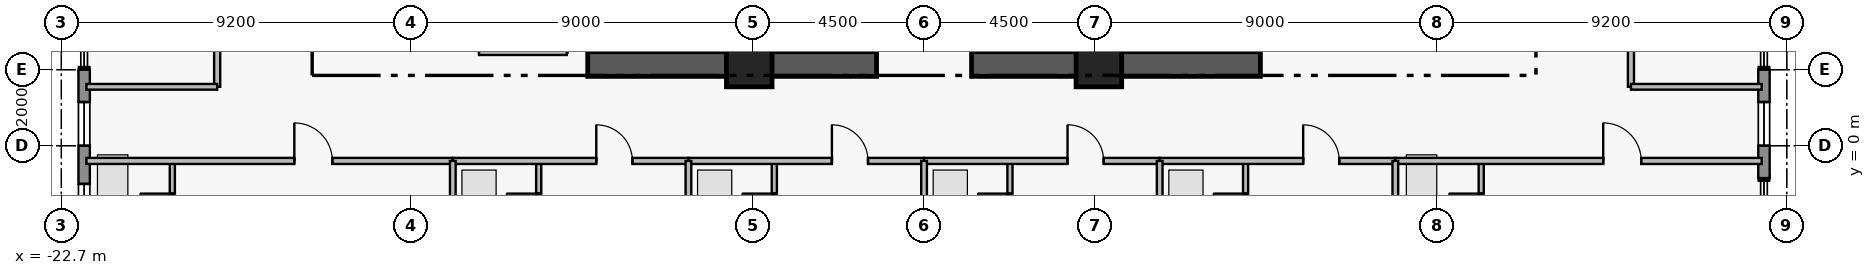
"""IFC4 building model, lengths in metres.
Left out: names, types, materials, properties, quantities, classifications, styles, units other than length and angle.
Written with IfcOpenShell. Run it as: python <this file> out.ifc"""

import sys

from ifc_helpers import new_model, si_unit, direction, frame, frame_2d, origin, origin_2d, place, context, subcontext, project, spatial, rectangle, extrude, element, fill, save


model = new_model("IFC4")
c1 = context("Model", 3, precision=1e-05, world=origin(), true_north=direction((0.0, 1.0)))
c2 = subcontext(c1, "Body", "Model", "MODEL_VIEW")
j1 = project(units=[si_unit("LENGTHUNIT", "METRE"), si_unit("PLANEANGLEUNIT", "RADIAN")], contexts=[c1])
p1 = place(None, origin())
s1 = spatial("IfcSite", under=j1, at=p1, CompositionType="ELEMENT")
p2 = place(p1, origin())
s2 = spatial("IfcBuilding", under=s1, at=p2, CompositionType="ELEMENT")
p3 = place(p2, frame((0.0, 0.0, 192.4)))
s3 = spatial("IfcBuildingStorey", under=s2, at=p3, CompositionType="ELEMENT", Elevation=192.4)
for number, where, z_axis, x_axis in (
    (1, (-8.85, 2.15, 0.0), (0.0, 0.0, 1.0), (1.0, 0.0, 0.0)),
    (2, (1.25, 2.15, 0.0), (0.0, 0.0, 1.0), (1.0, 0.0, 0.0)),
):
    element("IfcWall", number, at=place(p3, frame(where, z_axis=z_axis, x_axis=x_axis)), inside=s3, PredefinedType="SHEAR", context=c2, shape_type="SweptSolid", body=[
        extrude(rectangle(XDim=7.6, YDim=0.65, at=frame_2d((3.8, 0.0))), origin(), (0.0, 0.0, 1.0), 3.53),
    ])
for number, where, z_axis, x_axis in (
    (3, (-4.6, 2.15, 0.0), (0.0, 0.0, 1.0), (1.0, 0.0, 0.0)),
    (4, (4.6, 2.15, 0.0), (0.0, 0.0, 1.0), (1.0, 0.0, 0.0)),
):
    element("IfcColumn", number, at=place(p3, frame(where, z_axis=z_axis, x_axis=x_axis)), inside=s3, PredefinedType="COLUMN", context=c2, shape_type="SweptSolid", body=[
        extrude(rectangle(XDim=1.2, YDim=1.2, at=origin_2d()), origin(), (0.0, 0.0, 1.0), 3.75),
    ])
p4 = place(p3, frame((-22.1, -4.2, 0.0), z_axis=(0.0, 0.0, 1.0), x_axis=(0.0, 1.0, 0.0)))
e5 = element("IfcWall", 5, at=p4, inside=s3, PredefinedType="STANDARD", context=c2, shape_type="SweptSolid", body=[
    extrude(rectangle(XDim=6.2, YDim=0.3, at=frame_2d((3.1, 0.0))), origin(), (0.0, 0.0, 1.0), 3.53),
])
p5 = place(p4, frame((2.045, 0.0, 0.95)))
e6 = element("IfcOpeningElement", 6, at=p5, cuts=e5, PredefinedType="OPENING", context=c2, shape_type="SweptSolid", body=[
    extrude(rectangle(XDim=1.15, YDim=1.55, at=frame_2d((0.575, 0.775))), frame((0.0, 0.16, 0.0), z_axis=(0.0, -1.0, 0.0), x_axis=(1.0, 0.0, 0.0)), (0.0, 0.0, 1.0), 0.32),
])
p6 = place(p4, frame((4.2, 0.0, 0.95)))
e7 = element("IfcOpeningElement", 7, at=p6, cuts=e5, PredefinedType="OPENING", context=c2, shape_type="SweptSolid", body=[
    extrude(rectangle(XDim=1.15, YDim=1.55, at=frame_2d((0.575, 0.775))), frame((0.0, 0.16, 0.0), z_axis=(0.0, -1.0, 0.0), x_axis=(1.0, 0.0, 0.0)), (0.0, 0.0, 1.0), 0.32),
])
p7 = place(p3, frame((22.1, 2.0, 0.0), z_axis=(0.0, 0.0, 1.0), x_axis=(0.0, -1.0, 0.0)))
e8 = element("IfcWall", 8, at=p7, inside=s3, PredefinedType="STANDARD", context=c2, shape_type="SweptSolid", body=[
    extrude(rectangle(XDim=2.85, YDim=0.3, at=frame_2d((1.425, 0.0))), origin(), (0.0, 0.0, 1.0), 3.53),
])
p8 = place(p7, frame((0.85, 0.0, 0.95)))
e9 = element("IfcOpeningElement", 9, at=p8, cuts=e8, PredefinedType="OPENING", context=c2, shape_type="SweptSolid", body=[
    extrude(rectangle(XDim=1.15, YDim=1.55, at=frame_2d((0.575, 0.775))), frame((0.0, 0.16, 0.0), z_axis=(0.0, -1.0, 0.0), x_axis=(1.0, 0.0, 0.0)), (0.0, 0.0, 1.0), 0.32),
])
p9 = place(p3, frame((-19.78, -2.76, 0.0), z_axis=(0.0, 0.0, 1.0), x_axis=(0.0, 1.0, 0.0)))
e10 = element("IfcWall", 10, at=p9, inside=s3, PredefinedType="PLUMBINGWALL", context=c2, shape_type="SweptSolid", body=[
    extrude(rectangle(XDim=2.36, YDim=0.135, at=frame_2d((1.18, 0.0))), origin(), (0.0, 0.0, 1.0), 3.53),
])
p10 = place(p9, frame((0.65, 0.0, 0.0)))
e11 = element("IfcOpeningElement", 11, at=p10, cuts=e10, PredefinedType="OPENING", context=c2, shape_type="SweptSolid", body=[
    extrude(rectangle(XDim=0.85, YDim=2.1, at=frame_2d((0.425, 1.05))), frame((0.0, 0.077, 0.0), z_axis=(0.0, -1.0, 0.0), x_axis=(1.0, 0.0, 0.0)), (0.0, 0.0, 1.0), 0.155),
])
p11 = place(p3, frame((-22.04, -0.4, 0.0), z_axis=(0.0, 0.0, 1.0), x_axis=(1.0, 0.0, 0.0)))
e12 = element("IfcWall", 12, at=p11, inside=s3, PredefinedType="PARTITIONING", context=c2, shape_type="SweptSolid", body=[
    extrude(rectangle(XDim=9.64, YDim=0.16, at=frame_2d((4.82, 0.0))), origin(), (0.0, 0.0, 1.0), 3.53),
])
p12 = place(p11, frame((5.47, 0.0, 0.0)))
e13 = element("IfcOpeningElement", 13, at=p12, cuts=e12, PredefinedType="OPENING", context=c2, shape_type="SweptSolid", body=[
    extrude(rectangle(XDim=1.0, YDim=2.15, at=frame_2d((0.5, 1.075))), frame((0.0, 0.09, 0.0), z_axis=(0.0, -1.0, 0.0), x_axis=(1.0, 0.0, 0.0)), (0.0, 0.0, 1.0), 0.18),
])
p13 = place(p3, frame((-10.14, -2.76, 0.0), z_axis=(0.0, 0.0, 1.0), x_axis=(0.0, 1.0, 0.0)))
e14 = element("IfcWall", 14, at=p13, inside=s3, PredefinedType="PLUMBINGWALL", context=c2, shape_type="SweptSolid", body=[
    extrude(rectangle(XDim=2.36, YDim=0.135, at=frame_2d((1.18, 0.0))), origin(), (0.0, 0.0, 1.0), 3.53),
])
p14 = place(p13, frame((0.65, 0.0, 0.0)))
e15 = element("IfcOpeningElement", 15, at=p14, cuts=e14, PredefinedType="OPENING", context=c2, shape_type="SweptSolid", body=[
    extrude(rectangle(XDim=0.85, YDim=2.1, at=frame_2d((0.425, 1.05))), frame((0.0, 0.077, 0.0), z_axis=(0.0, -1.0, 0.0), x_axis=(1.0, 0.0, 0.0)), (0.0, 0.0, 1.0), 0.155),
])
p15 = place(p3, frame((-12.4, -0.4, 0.0), z_axis=(0.0, 0.0, 1.0), x_axis=(1.0, 0.0, 0.0)))
e16 = element("IfcWall", 16, at=p15, inside=s3, PredefinedType="PARTITIONING", context=c2, shape_type="SweptSolid", body=[
    extrude(rectangle(XDim=6.2, YDim=0.16, at=frame_2d((3.1, 0.0))), origin(), (0.0, 0.0, 1.0), 3.53),
])
p16 = place(p15, frame((3.775, 0.0, 0.0)))
e17 = element("IfcOpeningElement", 17, at=p16, cuts=e16, PredefinedType="OPENING", context=c2, shape_type="SweptSolid", body=[
    extrude(rectangle(XDim=0.95, YDim=2.15, at=frame_2d((0.475, 1.075))), frame((0.0, 0.09, 0.0), z_axis=(0.0, -1.0, 0.0), x_axis=(1.0, 0.0, 0.0)), (0.0, 0.0, 1.0), 0.18),
])
p17 = place(p3, frame((-3.94, -2.76, 0.0), z_axis=(0.0, 0.0, 1.0), x_axis=(0.0, 1.0, 0.0)))
e18 = element("IfcWall", 18, at=p17, inside=s3, PredefinedType="PLUMBINGWALL", context=c2, shape_type="SweptSolid", body=[
    extrude(rectangle(XDim=2.36, YDim=0.135, at=frame_2d((1.18, 0.0))), origin(), (0.0, 0.0, 1.0), 3.53),
])
p18 = place(p17, frame((0.65, 0.0, 0.0)))
e19 = element("IfcOpeningElement", 19, at=p18, cuts=e18, PredefinedType="OPENING", context=c2, shape_type="SweptSolid", body=[
    extrude(rectangle(XDim=0.85, YDim=2.1, at=frame_2d((0.425, 1.05))), frame((0.0, 0.077, 0.0), z_axis=(0.0, -1.0, 0.0), x_axis=(1.0, 0.0, 0.0)), (0.0, 0.0, 1.0), 0.155),
])
p19 = place(p3, frame((-6.2, -0.4, 0.0), z_axis=(0.0, 0.0, 1.0), x_axis=(1.0, 0.0, 0.0)))
e20 = element("IfcWall", 20, at=p19, inside=s3, PredefinedType="PARTITIONING", context=c2, shape_type="SweptSolid", body=[
    extrude(rectangle(XDim=6.2, YDim=0.16, at=frame_2d((3.1, 0.0))), origin(), (0.0, 0.0, 1.0), 3.53),
])
p20 = place(p19, frame((3.775, 0.0, 0.0)))
e21 = element("IfcOpeningElement", 21, at=p20, cuts=e20, PredefinedType="OPENING", context=c2, shape_type="SweptSolid", body=[
    extrude(rectangle(XDim=0.95, YDim=2.15, at=frame_2d((0.475, 1.075))), frame((0.0, 0.09, 0.0), z_axis=(0.0, -1.0, 0.0), x_axis=(1.0, 0.0, 0.0)), (0.0, 0.0, 1.0), 0.18),
])
p21 = place(p3, frame((2.26, -2.76, 0.0), z_axis=(0.0, 0.0, 1.0), x_axis=(0.0, 1.0, 0.0)))
e22 = element("IfcWall", 22, at=p21, inside=s3, PredefinedType="PLUMBINGWALL", context=c2, shape_type="SweptSolid", body=[
    extrude(rectangle(XDim=2.36, YDim=0.135, at=frame_2d((1.18, 0.0))), origin(), (0.0, 0.0, 1.0), 3.53),
])
p22 = place(p21, frame((0.65, 0.0, 0.0)))
e23 = element("IfcOpeningElement", 23, at=p22, cuts=e22, PredefinedType="OPENING", context=c2, shape_type="SweptSolid", body=[
    extrude(rectangle(XDim=0.85, YDim=2.1, at=frame_2d((0.425, 1.05))), frame((0.0, 0.077, 0.0), z_axis=(0.0, -1.0, 0.0), x_axis=(1.0, 0.0, 0.0)), (0.0, 0.0, 1.0), 0.155),
])
p23 = place(p3, frame((0.0, -0.4, 0.0), z_axis=(0.0, 0.0, 1.0), x_axis=(1.0, 0.0, 0.0)))
e24 = element("IfcWall", 24, at=p23, inside=s3, PredefinedType="PARTITIONING", context=c2, shape_type="SweptSolid", body=[
    extrude(rectangle(XDim=6.2, YDim=0.16, at=frame_2d((3.1, 0.0))), origin(), (0.0, 0.0, 1.0), 3.53),
])
p24 = place(p23, frame((3.775, 0.0, 0.0)))
e25 = element("IfcOpeningElement", 25, at=p24, cuts=e24, PredefinedType="OPENING", context=c2, shape_type="SweptSolid", body=[
    extrude(rectangle(XDim=0.95, YDim=2.15, at=frame_2d((0.475, 1.075))), frame((0.0, 0.09, 0.0), z_axis=(0.0, -1.0, 0.0), x_axis=(1.0, 0.0, 0.0)), (0.0, 0.0, 1.0), 0.18),
])
p25 = place(p3, frame((8.46, -2.76, 0.0), z_axis=(0.0, 0.0, 1.0), x_axis=(0.0, 1.0, 0.0)))
e26 = element("IfcWall", 26, at=p25, inside=s3, PredefinedType="PLUMBINGWALL", context=c2, shape_type="SweptSolid", body=[
    extrude(rectangle(XDim=2.36, YDim=0.135, at=frame_2d((1.18, 0.0))), origin(), (0.0, 0.0, 1.0), 3.53),
])
p26 = place(p25, frame((0.65, 0.0, 0.0)))
e27 = element("IfcOpeningElement", 27, at=p26, cuts=e26, PredefinedType="OPENING", context=c2, shape_type="SweptSolid", body=[
    extrude(rectangle(XDim=0.85, YDim=2.1, at=frame_2d((0.425, 1.05))), frame((0.0, 0.077, 0.0), z_axis=(0.0, -1.0, 0.0), x_axis=(1.0, 0.0, 0.0)), (0.0, 0.0, 1.0), 0.155),
])
p27 = place(p3, frame((6.2, -0.4, 0.0), z_axis=(0.0, 0.0, 1.0), x_axis=(1.0, 0.0, 0.0)))
e28 = element("IfcWall", 28, at=p27, inside=s3, PredefinedType="PARTITIONING", context=c2, shape_type="SweptSolid", body=[
    extrude(rectangle(XDim=6.2, YDim=0.16, at=frame_2d((3.1, 0.0))), origin(), (0.0, 0.0, 1.0), 3.53),
])
p28 = place(p27, frame((3.775, 0.0, 0.0)))
e29 = element("IfcOpeningElement", 29, at=p28, cuts=e28, PredefinedType="OPENING", context=c2, shape_type="SweptSolid", body=[
    extrude(rectangle(XDim=0.95, YDim=2.15, at=frame_2d((0.475, 1.075))), frame((0.0, 0.09, 0.0), z_axis=(0.0, -1.0, 0.0), x_axis=(1.0, 0.0, 0.0)), (0.0, 0.0, 1.0), 0.18),
])
p29 = place(p3, frame((14.66, -2.76, 0.0), z_axis=(0.0, 0.0, 1.0), x_axis=(0.0, 1.0, 0.0)))
e30 = element("IfcWall", 30, at=p29, inside=s3, PredefinedType="PLUMBINGWALL", context=c2, shape_type="SweptSolid", body=[
    extrude(rectangle(XDim=2.36, YDim=0.135, at=frame_2d((1.18, 0.0))), origin(), (0.0, 0.0, 1.0), 3.53),
])
p30 = place(p29, frame((0.65, 0.0, 0.0)))
e31 = element("IfcOpeningElement", 31, at=p30, cuts=e30, PredefinedType="OPENING", context=c2, shape_type="SweptSolid", body=[
    extrude(rectangle(XDim=0.85, YDim=2.1, at=frame_2d((0.425, 1.05))), frame((0.0, 0.077, 0.0), z_axis=(0.0, -1.0, 0.0), x_axis=(1.0, 0.0, 0.0)), (0.0, 0.0, 1.0), 0.155),
])
p31 = place(p3, frame((12.4, -0.4, 0.0), z_axis=(0.0, 0.0, 1.0), x_axis=(1.0, 0.0, 0.0)))
e32 = element("IfcWall", 32, at=p31, inside=s3, PredefinedType="PARTITIONING", context=c2, shape_type="SweptSolid", body=[
    extrude(rectangle(XDim=9.64, YDim=0.16, at=frame_2d((4.82, 0.0))), origin(), (0.0, 0.0, 1.0), 3.53),
])
p32 = place(p31, frame((5.47, 0.0, 0.0)))
e33 = element("IfcOpeningElement", 33, at=p32, cuts=e32, PredefinedType="OPENING", context=c2, shape_type="SweptSolid", body=[
    extrude(rectangle(XDim=1.0, YDim=2.15, at=frame_2d((0.5, 1.075))), frame((0.0, 0.09, 0.0), z_axis=(0.0, -1.0, 0.0), x_axis=(1.0, 0.0, 0.0)), (0.0, 0.0, 1.0), 0.18),
])
p33 = place(p3, frame((18.6, 1.55, 0.0), z_axis=(0.0, 0.0, 1.0), x_axis=(0.0, 1.0, 0.0)))
e34 = element("IfcWall", 34, at=p33, inside=s3, PredefinedType="PARTITIONING", context=c2, shape_type="SweptSolid", body=[
    extrude(rectangle(XDim=5.2, YDim=0.16, at=frame_2d((2.6, 0.0))), origin(), (0.0, 0.0, 1.0), 3.53),
])
p34 = place(p33, frame((2.14, 0.0, 0.0)))
e35 = element("IfcOpeningElement", 35, at=p34, cuts=e34, PredefinedType="OPENING", context=c2, shape_type="SweptSolid", body=[
    extrude(rectangle(XDim=0.92, YDim=2.12, at=frame_2d((0.46, 1.06))), frame((0.0, 0.09, 0.0), z_axis=(0.0, -1.0, 0.0), x_axis=(1.0, 0.0, 0.0)), (0.0, 0.0, 1.0), 0.18),
])
p35 = place(p3, frame((-18.6, 1.55, 0.0), z_axis=(0.0, 0.0, 1.0), x_axis=(0.0, 1.0, 0.0)))
e36 = element("IfcWall", 36, at=p35, inside=s3, PredefinedType="PARTITIONING", context=c2, shape_type="SweptSolid", body=[
    extrude(rectangle(XDim=5.2, YDim=0.16, at=frame_2d((2.6, 0.0))), origin(), (0.0, 0.0, 1.0), 3.53),
])
p36 = place(p35, frame((2.125, 0.0, 0.0)))
e37 = element("IfcOpeningElement", 37, at=p36, cuts=e36, PredefinedType="OPENING", context=c2, shape_type="SweptSolid", body=[
    extrude(rectangle(XDim=0.95, YDim=2.15, at=frame_2d((0.475, 1.075))), frame((0.0, 0.09, 0.0), z_axis=(0.0, -1.0, 0.0), x_axis=(1.0, 0.0, 0.0)), (0.0, 0.0, 1.0), 0.18),
])
p37 = place(p3, frame((-11.71, 2.47, 0.0), z_axis=(0.0, 0.0, 1.0), x_axis=(1.0, 0.0, 0.0)))
e38 = element("IfcWall", 38, at=p37, inside=s3, PredefinedType="PARTITIONING", context=c2, shape_type="SweptSolid", body=[
    extrude(rectangle(XDim=2.31, YDim=0.165, at=frame_2d((1.155, 0.0))), origin(), (0.0, 0.0, 1.0), 2.43),
])
for number, where, z_axis, x_axis in (
    (39, (-12.4, -7.52, 0.0), (0.0, 0.0, 1.0), (0.0, 1.0, 0.0)),
    (40, (-6.2, -7.52, 0.0), (0.0, 0.0, 1.0), (0.0, 1.0, 0.0)),
    (41, (0.0, -7.52, 0.0), (0.0, 0.0, 1.0), (0.0, 1.0, 0.0)),
    (42, (6.2, -7.52, 0.0), (0.0, 0.0, 1.0), (0.0, 1.0, 0.0)),
    (43, (12.4, -7.52, 0.0), (0.0, 0.0, 1.0), (0.0, 1.0, 0.0)),
):
    element("IfcWall", number, at=place(p3, frame(where, z_axis=z_axis, x_axis=x_axis)), inside=s3, PredefinedType="PARTITIONING", context=c2, shape_type="SweptSolid", body=[
        extrude(rectangle(XDim=7.12, YDim=0.15, at=frame_2d((3.56, 0.0))), origin(), (0.0, 0.0, 1.0), 3.53),
    ])
for number, where, z_axis, x_axis in (
    (44, (18.6, 1.55, 0.0), (0.0, 0.0, 1.0), (1.0, 0.0, 0.0)),
    (45, (-22.04, 1.55, 0.0), (0.0, 0.0, 1.0), (1.0, 0.0, 0.0)),
):
    element("IfcWall", number, at=place(p3, frame(where, z_axis=z_axis, x_axis=x_axis)), inside=s3, PredefinedType="PARTITIONING", context=c2, shape_type="SweptSolid", body=[
        extrude(rectangle(XDim=3.44, YDim=0.15, at=frame_2d((1.72, 0.0))), origin(), (0.0, 0.0, 1.0), 3.53),
    ])
p38 = place(p5, origin())
e46 = element("IfcWindow", 46, at=p38, inside=s3, PartitioningType="SINGLE_PANEL", PredefinedType="WINDOW", context=c2, shape_type="SweptSolid", body=[
    extrude(rectangle(XDim=1.15, YDim=1.55, at=frame_2d((0.575, 0.775))), frame((0.0, 0.03, 0.0), z_axis=(0.0, -1.0, 0.0), x_axis=(1.0, 0.0, 0.0)), (0.0, 0.0, 1.0), 0.06),
])
fill(e6, e46)
p39 = place(p6, origin())
e47 = element("IfcWindow", 47, at=p39, inside=s3, PartitioningType="SINGLE_PANEL", PredefinedType="WINDOW", context=c2, shape_type="SweptSolid", body=[
    extrude(rectangle(XDim=1.15, YDim=1.55, at=frame_2d((0.575, 0.775))), frame((0.0, 0.03, 0.0), z_axis=(0.0, -1.0, 0.0), x_axis=(1.0, 0.0, 0.0)), (0.0, 0.0, 1.0), 0.06),
])
fill(e7, e47)
p40 = place(p8, origin())
e48 = element("IfcWindow", 48, at=p40, inside=s3, PartitioningType="SINGLE_PANEL", PredefinedType="WINDOW", context=c2, shape_type="SweptSolid", body=[
    extrude(rectangle(XDim=1.15, YDim=1.55, at=frame_2d((0.575, 0.775))), frame((0.0, 0.03, 0.0), z_axis=(0.0, -1.0, 0.0), x_axis=(1.0, 0.0, 0.0)), (0.0, 0.0, 1.0), 0.06),
])
fill(e9, e48)
p41 = place(p10, origin())
e49 = element("IfcDoor", 49, at=p41, inside=s3, OperationType="SINGLE_SWING_RIGHT", PredefinedType="DOOR", context=c2, shape_type="SweptSolid", body=[
    extrude(rectangle(XDim=0.85, YDim=2.1, at=frame_2d((0.425, 1.05))), frame((0.0, 0.025, 0.0), z_axis=(0.0, -1.0, 0.0), x_axis=(1.0, 0.0, 0.0)), (0.0, 0.0, 1.0), 0.05),
])
fill(e11, e49)
p42 = place(p12, origin())
e50 = element("IfcDoor", 50, at=p42, inside=s3, OperationType="SINGLE_SWING_LEFT", PredefinedType="DOOR", context=c2, shape_type="SweptSolid", body=[
    extrude(rectangle(XDim=1.0, YDim=2.15, at=frame_2d((0.5, 1.075))), frame((0.0, 0.025, 0.0), z_axis=(0.0, -1.0, 0.0), x_axis=(1.0, 0.0, 0.0)), (0.0, 0.0, 1.0), 0.05),
])
fill(e13, e50)
p43 = place(p14, origin())
e51 = element("IfcDoor", 51, at=p43, inside=s3, OperationType="SINGLE_SWING_RIGHT", PredefinedType="DOOR", context=c2, shape_type="SweptSolid", body=[
    extrude(rectangle(XDim=0.85, YDim=2.1, at=frame_2d((0.425, 1.05))), frame((0.0, 0.025, 0.0), z_axis=(0.0, -1.0, 0.0), x_axis=(1.0, 0.0, 0.0)), (0.0, 0.0, 1.0), 0.05),
])
fill(e15, e51)
p44 = place(p16, origin())
e52 = element("IfcDoor", 52, at=p44, inside=s3, OperationType="SINGLE_SWING_LEFT", PredefinedType="DOOR", context=c2, shape_type="SweptSolid", body=[
    extrude(rectangle(XDim=0.95, YDim=2.15, at=frame_2d((0.475, 1.075))), frame((0.0, 0.025, 0.0), z_axis=(0.0, -1.0, 0.0), x_axis=(1.0, 0.0, 0.0)), (0.0, 0.0, 1.0), 0.05),
])
fill(e17, e52)
p45 = place(p18, origin())
e53 = element("IfcDoor", 53, at=p45, inside=s3, OperationType="SINGLE_SWING_RIGHT", PredefinedType="DOOR", context=c2, shape_type="SweptSolid", body=[
    extrude(rectangle(XDim=0.85, YDim=2.1, at=frame_2d((0.425, 1.05))), frame((0.0, 0.025, 0.0), z_axis=(0.0, -1.0, 0.0), x_axis=(1.0, 0.0, 0.0)), (0.0, 0.0, 1.0), 0.05),
])
fill(e19, e53)
p46 = place(p20, origin())
e54 = element("IfcDoor", 54, at=p46, inside=s3, OperationType="SINGLE_SWING_LEFT", PredefinedType="DOOR", context=c2, shape_type="SweptSolid", body=[
    extrude(rectangle(XDim=0.95, YDim=2.15, at=frame_2d((0.475, 1.075))), frame((0.0, 0.025, 0.0), z_axis=(0.0, -1.0, 0.0), x_axis=(1.0, 0.0, 0.0)), (0.0, 0.0, 1.0), 0.05),
])
fill(e21, e54)
p47 = place(p22, origin())
e55 = element("IfcDoor", 55, at=p47, inside=s3, OperationType="SINGLE_SWING_RIGHT", PredefinedType="DOOR", context=c2, shape_type="SweptSolid", body=[
    extrude(rectangle(XDim=0.85, YDim=2.1, at=frame_2d((0.425, 1.05))), frame((0.0, 0.025, 0.0), z_axis=(0.0, -1.0, 0.0), x_axis=(1.0, 0.0, 0.0)), (0.0, 0.0, 1.0), 0.05),
])
fill(e23, e55)
p48 = place(p24, origin())
e56 = element("IfcDoor", 56, at=p48, inside=s3, OperationType="SINGLE_SWING_LEFT", PredefinedType="DOOR", context=c2, shape_type="SweptSolid", body=[
    extrude(rectangle(XDim=0.95, YDim=2.15, at=frame_2d((0.475, 1.075))), frame((0.0, 0.025, 0.0), z_axis=(0.0, -1.0, 0.0), x_axis=(1.0, 0.0, 0.0)), (0.0, 0.0, 1.0), 0.05),
])
fill(e25, e56)
p49 = place(p26, origin())
e57 = element("IfcDoor", 57, at=p49, inside=s3, OperationType="SINGLE_SWING_RIGHT", PredefinedType="DOOR", context=c2, shape_type="SweptSolid", body=[
    extrude(rectangle(XDim=0.85, YDim=2.1, at=frame_2d((0.425, 1.05))), frame((0.0, 0.025, 0.0), z_axis=(0.0, -1.0, 0.0), x_axis=(1.0, 0.0, 0.0)), (0.0, 0.0, 1.0), 0.05),
])
fill(e27, e57)
p50 = place(p28, origin())
e58 = element("IfcDoor", 58, at=p50, inside=s3, OperationType="SINGLE_SWING_LEFT", PredefinedType="DOOR", context=c2, shape_type="SweptSolid", body=[
    extrude(rectangle(XDim=0.95, YDim=2.15, at=frame_2d((0.475, 1.075))), frame((0.0, 0.025, 0.0), z_axis=(0.0, -1.0, 0.0), x_axis=(1.0, 0.0, 0.0)), (0.0, 0.0, 1.0), 0.05),
])
fill(e29, e58)
p51 = place(p30, origin())
e59 = element("IfcDoor", 59, at=p51, inside=s3, OperationType="SINGLE_SWING_RIGHT", PredefinedType="DOOR", context=c2, shape_type="SweptSolid", body=[
    extrude(rectangle(XDim=0.85, YDim=2.1, at=frame_2d((0.425, 1.05))), frame((0.0, 0.025, 0.0), z_axis=(0.0, -1.0, 0.0), x_axis=(1.0, 0.0, 0.0)), (0.0, 0.0, 1.0), 0.05),
])
fill(e31, e59)
p52 = place(p32, origin())
e60 = element("IfcDoor", 60, at=p52, inside=s3, OperationType="SINGLE_SWING_LEFT", PredefinedType="DOOR", context=c2, shape_type="SweptSolid", body=[
    extrude(rectangle(XDim=1.0, YDim=2.15, at=frame_2d((0.5, 1.075))), frame((0.0, 0.025, 0.0), z_axis=(0.0, -1.0, 0.0), x_axis=(1.0, 0.0, 0.0)), (0.0, 0.0, 1.0), 0.05),
])
fill(e33, e60)
save(model, sys.argv[1])
